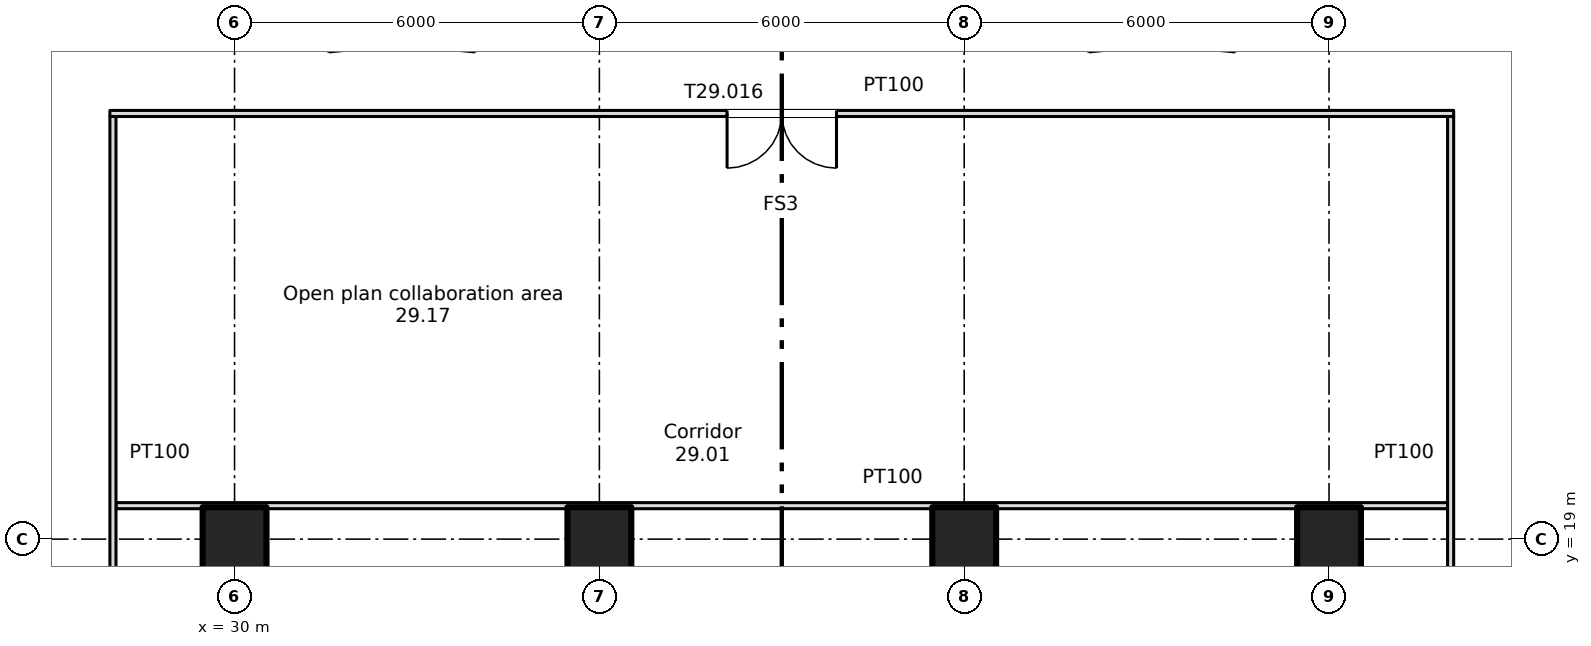
"""IFC4 building model, lengths in metres.
Left out: names, types, materials, properties, quantities, classifications, styles, units other than length and angle.
Written with IfcOpenShell. Run it as: python <this file> out.ifc"""

import sys

from ifc_helpers import new_model, si_unit, direction, frame, frame_2d, origin, origin_2d, place, context, subcontext, project, spatial, rectangle, extrude, element, fill, save


model = new_model("IFC4")
c1 = context("Model", 3, precision=1e-05, world=origin(), true_north=direction((0.0, 1.0)))
c2 = subcontext(c1, "Body", "Model", "MODEL_VIEW")
j1 = project(units=[si_unit("LENGTHUNIT", "METRE"), si_unit("PLANEANGLEUNIT", "RADIAN")], contexts=[c1])
p1 = place(None, origin())
s1 = spatial("IfcSite", under=j1, at=p1, CompositionType="ELEMENT")
p2 = place(p1, origin())
s2 = spatial("IfcBuilding", under=s1, at=p2, CompositionType="ELEMENT")
p3 = place(p2, frame((0.0, 0.0, 204.25)))
s3 = spatial("IfcBuildingStorey", under=s2, at=p3, CompositionType="ELEMENT", Elevation=204.25)
for number, where, z_axis, x_axis in (
    (1, (30.0, 19.0, 0.0), (0.0, 0.0, 1.0), (1.0, 0.0, 0.0)),
    (2, (36.0, 19.0, 0.0), (0.0, 0.0, 1.0), (1.0, 0.0, 0.0)),
    (3, (42.0, 19.0, 0.0), (0.0, 0.0, 1.0), (1.0, 0.0, 0.0)),
    (4, (48.0, 19.0, 0.0), (0.0, 0.0, 1.0), (1.0, 0.0, 0.0)),
):
    element("IfcColumn", number, at=place(p3, frame(where, z_axis=z_axis, x_axis=x_axis)), inside=s3, PredefinedType="COLUMN", context=c2, shape_type="SweptSolid", body=[
        extrude(rectangle(XDim=1.05, YDim=1.05, at=origin_2d()), origin(), (0.0, 0.0, 1.0), 3.35),
    ])
p4 = place(p3, frame((28.05, 19.55, 0.0), z_axis=(0.0, 0.0, 1.0), x_axis=(1.0, 0.0, 0.0)))
e5 = element("IfcWall", 5, at=p4, inside=s3, PredefinedType="PARTITIONING", context=c2, shape_type="SweptSolid", body=[
    extrude(rectangle(XDim=21.9, YDim=0.1, at=frame_2d((10.95, 0.0))), origin(), (0.0, 0.0, 1.0), 3.35),
])
p5 = place(p3, frame((27.95, 26.0, 0.0), z_axis=(0.0, 0.0, 1.0), x_axis=(1.0, 0.0, 0.0)))
e6 = element("IfcWall", 6, at=p5, inside=s3, PredefinedType="PARTITIONING", context=c2, shape_type="SweptSolid", body=[
    extrude(rectangle(XDim=22.1, YDim=0.1, at=frame_2d((11.05, 0.0))), origin(), (0.0, 0.0, 1.0), 3.35),
])
p6 = place(p5, frame((10.15, 0.0, 0.0)))
e7 = element("IfcOpeningElement", 7, at=p6, cuts=e6, PredefinedType="OPENING", context=c2, shape_type="SweptSolid", body=[
    extrude(rectangle(XDim=1.8, YDim=2.1, at=frame_2d((0.9, 1.05))), frame((0.0, 0.06, 0.0), z_axis=(0.0, -1.0, 0.0), x_axis=(1.0, 0.0, 0.0)), (0.0, 0.0, 1.0), 0.12),
])
for number, where, z_axis, x_axis in (
    (8, (28.0, 12.65, 0.0), (0.0, 0.0, 1.0), (0.0, 1.0, 0.0)),
    (9, (50.0, 12.65, 0.0), (0.0, 0.0, 1.0), (0.0, 1.0, 0.0)),
):
    element("IfcWall", number, at=place(p3, frame(where, z_axis=z_axis, x_axis=x_axis)), inside=s3, PredefinedType="PARTITIONING", context=c2, shape_type="SweptSolid", body=[
        extrude(rectangle(XDim=13.3, YDim=0.1, at=frame_2d((6.65, 0.0))), origin(), (0.0, 0.0, 1.0), 3.35),
    ])
p7 = place(p6, origin())
e10 = element("IfcDoor", 10, at=p7, inside=s3, OperationType="DOUBLE_DOOR_SINGLE_SWING", PredefinedType="DOOR", context=c2, shape_type="SweptSolid", body=[
    extrude(rectangle(XDim=1.8, YDim=2.1, at=frame_2d((0.9, 1.05))), frame((0.0, 0.025, 0.0), z_axis=(0.0, -1.0, 0.0), x_axis=(1.0, 0.0, 0.0)), (0.0, 0.0, 1.0), 0.05),
])
fill(e7, e10)
save(model, sys.argv[1])
